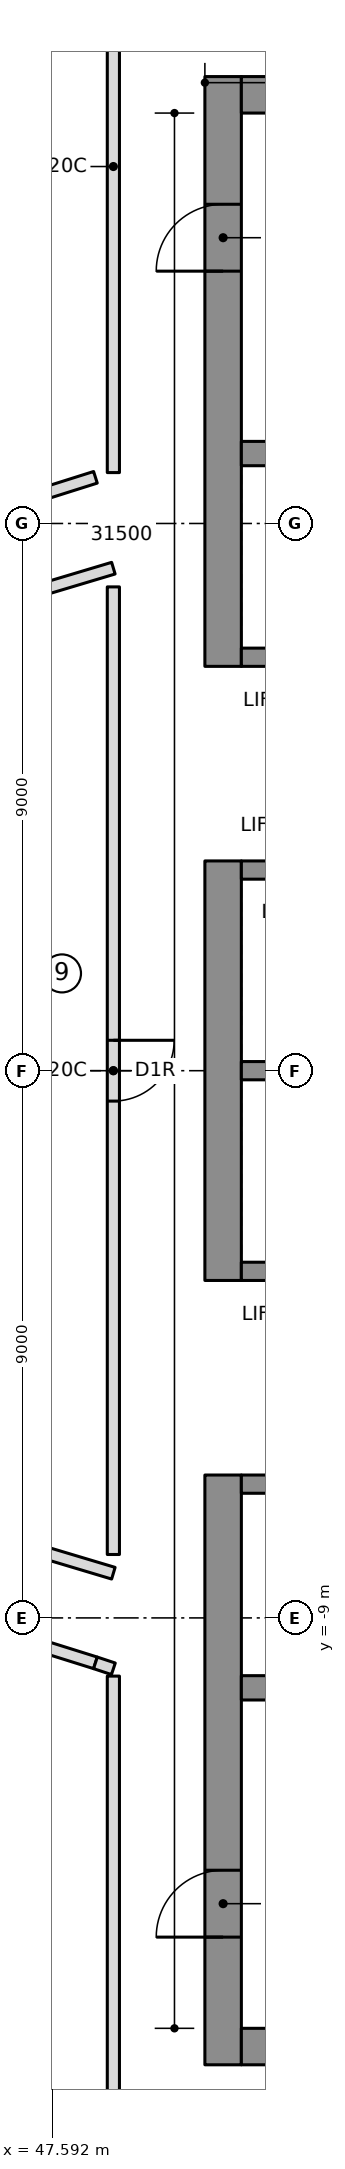
"""IFC4 building model, lengths in metres.
Left out: names, types, materials, properties, quantities, classifications, styles, units other than length and angle.
Written with IfcOpenShell. Run it as: python <this file> out.ifc"""

import sys

from ifc_helpers import new_model, si_unit, direction, frame, frame_2d, origin, place, context, subcontext, project, spatial, rectangle, extrude, element, fill, save


model = new_model("IFC4")
c1 = context("Model", 3, precision=1e-05, world=origin(), true_north=direction((0.0, 1.0)))
c2 = subcontext(c1, "Body", "Model", "MODEL_VIEW")
j1 = project(units=[si_unit("LENGTHUNIT", "METRE"), si_unit("PLANEANGLEUNIT", "RADIAN")], contexts=[c1])
p1 = place(None, origin())
s1 = spatial("IfcSite", under=j1, at=p1, CompositionType="ELEMENT")
p2 = place(p1, origin())
s2 = spatial("IfcBuilding", under=s1, at=p2, CompositionType="ELEMENT")
p3 = place(p2, frame((0.0, 0.0, 238.55)))
s3 = spatial("IfcBuildingStorey", under=s2, at=p3, CompositionType="ELEMENT", Elevation=238.55)
p4 = place(p3, frame((50.4, 6.65, 0.0), z_axis=(0.0, 0.0, 1.0), x_axis=(0.0, 1.0, 0.0)))
e1 = element("IfcWall", 1, at=p4, inside=s3, PredefinedType="SHEAR", context=c2, shape_type="SweptSolid", body=[
    extrude(rectangle(XDim=9.7, YDim=0.6, at=frame_2d((4.85, 0.0))), origin(), (0.0, 0.0, 1.0), 3.55),
])
p5 = place(p4, frame((6.5, 0.0, 0.0)))
e2 = element("IfcOpeningElement", 2, at=p5, cuts=e1, PredefinedType="OPENING", context=c2, shape_type="SweptSolid", body=[
    extrude(rectangle(XDim=1.1, YDim=2.1, at=frame_2d((0.55, 1.05))), frame((0.0, 0.31, 0.0), z_axis=(0.0, -1.0, 0.0), x_axis=(1.0, 0.0, 0.0)), (0.0, 0.0, 1.0), 0.62),
])
p6 = place(p3, frame((50.4, -3.45, 0.0), z_axis=(0.0, 0.0, 1.0), x_axis=(0.0, 1.0, 0.0)))
e3 = element("IfcWall", 3, at=p6, inside=s3, PredefinedType="SHEAR", context=c2, shape_type="SweptSolid", body=[
    extrude(rectangle(XDim=6.9, YDim=0.6, at=frame_2d((3.45, 0.0))), origin(), (0.0, 0.0, 1.0), 3.55),
])
p7 = place(p3, frame((50.4, -16.35, 0.0), z_axis=(0.0, 0.0, 1.0), x_axis=(0.0, 1.0, 0.0)))
e4 = element("IfcWall", 4, at=p7, inside=s3, PredefinedType="SHEAR", context=c2, shape_type="SweptSolid", body=[
    extrude(rectangle(XDim=9.7, YDim=0.6, at=frame_2d((4.85, 0.0))), origin(), (0.0, 0.0, 1.0), 3.55),
])
p8 = place(p7, frame((2.1, 0.0, 0.0)))
e5 = element("IfcOpeningElement", 5, at=p8, cuts=e4, PredefinedType="OPENING", context=c2, shape_type="SweptSolid", body=[
    extrude(rectangle(XDim=1.1, YDim=2.1, at=frame_2d((0.55, 1.05))), frame((0.0, 0.31, 0.0), z_axis=(0.0, -1.0, 0.0), x_axis=(1.0, 0.0, 0.0)), (0.0, 0.0, 1.0), 0.62),
])
for number, where, z_axis, x_axis in (
    (6, (50.7, 16.05, 0.0), (0.0, 0.0, 1.0), (1.0, 0.0, 0.0)),
    (7, (50.7, -16.05, 0.0), (0.0, 0.0, 1.0), (1.0, 0.0, 0.0)),
):
    element("IfcWall", number, at=place(p3, frame(where, z_axis=z_axis, x_axis=x_axis)), inside=s3, PredefinedType="SHEAR", context=c2, shape_type="SweptSolid", body=[
        extrude(rectangle(XDim=13.62, YDim=0.6, at=frame_2d((6.81, 0.0))), origin(), (0.0, 0.0, 1.0), 3.55),
    ])
p9 = place(p3, frame((50.7, 10.15, 0.0), z_axis=(0.0, 0.0, 1.0), x_axis=(1.0, 0.0, 0.0)))
e8 = element("IfcWall", 8, at=p9, inside=s3, PredefinedType="SHEAR", context=c2, shape_type="SweptSolid", body=[
    extrude(rectangle(XDim=13.02, YDim=0.4, at=frame_2d((6.51, 0.0))), origin(), (0.0, 0.0, 1.0), 3.55),
])
p10 = place(p9, frame((0.7, 0.0, 0.0)))
e9 = element("IfcOpeningElement", 9, at=p10, cuts=e8, PredefinedType="OPENING", context=c2, shape_type="SweptSolid", body=[
    extrude(rectangle(XDim=1.1, YDim=2.1, at=frame_2d((0.55, 1.05))), frame((0.0, 0.21, 0.0), z_axis=(0.0, -1.0, 0.0), x_axis=(1.0, 0.0, 0.0)), (0.0, 0.0, 1.0), 0.42),
])
p11 = place(p9, frame((3.5, 0.0, 0.0)))
e10 = element("IfcOpeningElement", 10, at=p11, cuts=e8, PredefinedType="OPENING", context=c2, shape_type="SweptSolid", body=[
    extrude(rectangle(XDim=1.1, YDim=2.1, at=frame_2d((0.55, 1.05))), frame((0.0, 0.21, 0.0), z_axis=(0.0, -1.0, 0.0), x_axis=(1.0, 0.0, 0.0)), (0.0, 0.0, 1.0), 0.42),
])
p12 = place(p3, frame((50.7, -10.15, 0.0), z_axis=(0.0, 0.0, 1.0), x_axis=(1.0, 0.0, 0.0)))
e11 = element("IfcWall", 11, at=p12, inside=s3, PredefinedType="SHEAR", context=c2, shape_type="SweptSolid", body=[
    extrude(rectangle(XDim=13.02, YDim=0.4, at=frame_2d((6.51, 0.0))), origin(), (0.0, 0.0, 1.0), 3.55),
])
p13 = place(p3, frame((50.7, 0.0, 0.0), z_axis=(0.0, 0.0, 1.0), x_axis=(1.0, 0.0, 0.0)))
e12 = element("IfcWall", 12, at=p13, inside=s3, PredefinedType="SHEAR", context=c2, shape_type="SweptSolid", body=[
    extrude(rectangle(XDim=10.9, YDim=0.3, at=frame_2d((5.45, 0.0))), origin(), (0.0, 0.0, 1.0), 3.55),
])
p14 = place(p3, frame((50.7, 3.3, 0.0), z_axis=(0.0, 0.0, 1.0), x_axis=(1.0, 0.0, 0.0)))
e13 = element("IfcWall", 13, at=p14, inside=s3, PredefinedType="SHEAR", context=c2, shape_type="SweptSolid", body=[
    extrude(rectangle(XDim=10.9, YDim=0.3, at=frame_2d((5.45, 0.0))), origin(), (0.0, 0.0, 1.0), 3.55),
])
p15 = place(p14, frame((0.7, 0.0, 0.0)))
e14 = element("IfcOpeningElement", 14, at=p15, cuts=e13, PredefinedType="OPENING", context=c2, shape_type="SweptSolid", body=[
    extrude(rectangle(XDim=1.1, YDim=2.1, at=frame_2d((0.55, 1.05))), frame((0.0, 0.16, 0.0), z_axis=(0.0, -1.0, 0.0), x_axis=(1.0, 0.0, 0.0)), (0.0, 0.0, 1.0), 0.32),
])
p16 = place(p14, frame((3.5, 0.0, 0.0)))
e15 = element("IfcOpeningElement", 15, at=p16, cuts=e13, PredefinedType="OPENING", context=c2, shape_type="SweptSolid", body=[
    extrude(rectangle(XDim=1.1, YDim=2.1, at=frame_2d((0.55, 1.05))), frame((0.0, 0.16, 0.0), z_axis=(0.0, -1.0, 0.0), x_axis=(1.0, 0.0, 0.0)), (0.0, 0.0, 1.0), 0.32),
])
p17 = place(p14, frame((6.4, 0.0, 0.0)))
e16 = element("IfcOpeningElement", 16, at=p17, cuts=e13, PredefinedType="OPENING", context=c2, shape_type="SweptSolid", body=[
    extrude(rectangle(XDim=0.9, YDim=2.1, at=frame_2d((0.45, 1.05))), frame((0.0, 0.16, 0.0), z_axis=(0.0, -1.0, 0.0), x_axis=(1.0, 0.0, 0.0)), (0.0, 0.0, 1.0), 0.32),
])
p18 = place(p14, frame((9.2, 0.0, 0.0)))
e17 = element("IfcOpeningElement", 17, at=p18, cuts=e13, PredefinedType="OPENING", context=c2, shape_type="SweptSolid", body=[
    extrude(rectangle(XDim=0.9, YDim=2.1, at=frame_2d((0.45, 1.05))), frame((0.0, 0.16, 0.0), z_axis=(0.0, -1.0, 0.0), x_axis=(1.0, 0.0, 0.0)), (0.0, 0.0, 1.0), 0.32),
])
p19 = place(p3, frame((50.7, 6.8, 0.0), z_axis=(0.0, 0.0, 1.0), x_axis=(1.0, 0.0, 0.0)))
e18 = element("IfcWall", 18, at=p19, inside=s3, PredefinedType="SHEAR", context=c2, shape_type="SweptSolid", body=[
    extrude(rectangle(XDim=10.9, YDim=0.3, at=frame_2d((5.45, 0.0))), origin(), (0.0, 0.0, 1.0), 3.55),
])
p20 = place(p19, frame((6.4, 0.0, 0.0)))
e19 = element("IfcOpeningElement", 19, at=p20, cuts=e18, PredefinedType="OPENING", context=c2, shape_type="SweptSolid", body=[
    extrude(rectangle(XDim=0.9, YDim=2.1, at=frame_2d((0.45, 1.05))), frame((0.0, 0.16, 0.0), z_axis=(0.0, -1.0, 0.0), x_axis=(1.0, 0.0, 0.0)), (0.0, 0.0, 1.0), 0.32),
])
p21 = place(p19, frame((9.2, 0.0, 0.0)))
e20 = element("IfcOpeningElement", 20, at=p21, cuts=e18, PredefinedType="OPENING", context=c2, shape_type="SweptSolid", body=[
    extrude(rectangle(XDim=0.9, YDim=2.1, at=frame_2d((0.45, 1.05))), frame((0.0, 0.16, 0.0), z_axis=(0.0, -1.0, 0.0), x_axis=(1.0, 0.0, 0.0)), (0.0, 0.0, 1.0), 0.32),
])
p22 = place(p3, frame((50.7, -3.3, 0.0), z_axis=(0.0, 0.0, 1.0), x_axis=(1.0, 0.0, 0.0)))
e21 = element("IfcWall", 21, at=p22, inside=s3, PredefinedType="SHEAR", context=c2, shape_type="SweptSolid", body=[
    extrude(rectangle(XDim=10.9, YDim=0.3, at=frame_2d((5.45, 0.0))), origin(), (0.0, 0.0, 1.0), 3.55),
])
p23 = place(p22, frame((9.1, 0.0, 0.0)))
e22 = element("IfcOpeningElement", 22, at=p23, cuts=e21, PredefinedType="OPENING", context=c2, shape_type="SweptSolid", body=[
    extrude(rectangle(XDim=1.1, YDim=2.1, at=frame_2d((0.55, 1.05))), frame((0.0, 0.16, 0.0), z_axis=(0.0, -1.0, 0.0), x_axis=(1.0, 0.0, 0.0)), (0.0, 0.0, 1.0), 0.32),
])
p24 = place(p3, frame((50.7, -6.8, 0.0), z_axis=(0.0, 0.0, 1.0), x_axis=(1.0, 0.0, 0.0)))
e23 = element("IfcWall", 23, at=p24, inside=s3, PredefinedType="SHEAR", context=c2, shape_type="SweptSolid", body=[
    extrude(rectangle(XDim=10.9, YDim=0.3, at=frame_2d((5.45, 0.0))), origin(), (0.0, 0.0, 1.0), 3.55),
])
p25 = place(p24, frame((6.3, 0.0, 0.0)))
e24 = element("IfcOpeningElement", 24, at=p25, cuts=e23, PredefinedType="OPENING", context=c2, shape_type="SweptSolid", body=[
    extrude(rectangle(XDim=1.1, YDim=2.1, at=frame_2d((0.55, 1.05))), frame((0.0, 0.16, 0.0), z_axis=(0.0, -1.0, 0.0), x_axis=(1.0, 0.0, 0.0)), (0.0, 0.0, 1.0), 0.32),
])
p26 = place(p24, frame((9.1, 0.0, 0.0)))
e25 = element("IfcOpeningElement", 25, at=p26, cuts=e23, PredefinedType="OPENING", context=c2, shape_type="SweptSolid", body=[
    extrude(rectangle(XDim=1.1, YDim=2.1, at=frame_2d((0.55, 1.05))), frame((0.0, 0.16, 0.0), z_axis=(0.0, -1.0, 0.0), x_axis=(1.0, 0.0, 0.0)), (0.0, 0.0, 1.0), 0.32),
])
p27 = place(p24, frame((0.8, 0.0, 0.0)))
e26 = element("IfcOpeningElement", 26, at=p27, cuts=e23, PredefinedType="OPENING", context=c2, shape_type="SweptSolid", body=[
    extrude(rectangle(XDim=0.9, YDim=2.1, at=frame_2d((0.45, 1.05))), frame((0.0, 0.16, 0.0), z_axis=(0.0, -1.0, 0.0), x_axis=(1.0, 0.0, 0.0)), (0.0, 0.0, 1.0), 0.32),
])
p28 = place(p24, frame((3.6, 0.0, 0.0)))
e27 = element("IfcOpeningElement", 27, at=p28, cuts=e23, PredefinedType="OPENING", context=c2, shape_type="SweptSolid", body=[
    extrude(rectangle(XDim=0.9, YDim=2.1, at=frame_2d((0.45, 1.05))), frame((0.0, 0.16, 0.0), z_axis=(0.0, -1.0, 0.0), x_axis=(1.0, 0.0, 0.0)), (0.0, 0.0, 1.0), 0.32),
])
p29 = place(p3, frame((40.38, 7.257, 0.0), z_axis=(0.0, 0.0, 1.0), x_axis=(0.953536454425, 0.301277662768, 0.0)))
e28 = element("IfcWall", 28, at=p29, inside=s3, PredefinedType="PARTITIONING", context=c2, shape_type="SweptSolid", body=[
    extrude(rectangle(XDim=8.306, YDim=0.2, at=frame_2d((4.153, 0.0))), origin(), (0.0, 0.0, 1.0), 3.25),
])
p30 = place(p29, frame((2.8, 0.0, 0.0)))
e29 = element("IfcOpeningElement", 29, at=p30, cuts=e28, PredefinedType="OPENING", context=c2, shape_type="SweptSolid", body=[
    extrude(rectangle(XDim=1.5, YDim=2.1, at=frame_2d((0.75, 1.05))), frame((0.0, 0.11, 0.0), z_axis=(0.0, -1.0, 0.0), x_axis=(1.0, 0.0, 0.0)), (0.0, 0.0, 1.0), 0.22),
])
p31 = place(p3, frame((40.38, -7.257, 0.0), z_axis=(0.0, 0.0, 1.0), x_axis=(0.954235234728, -0.299057046068, 0.0)))
e30 = element("IfcWall", 30, at=p31, inside=s3, PredefinedType="PARTITIONING", context=c2, shape_type="SweptSolid", body=[
    extrude(rectangle(XDim=8.3, YDim=0.2, at=frame_2d((4.15, 0.0))), origin(), (0.0, 0.0, 1.0), 3.25),
])
p32 = place(p31, frame((2.8, 0.0, 0.0)))
e31 = element("IfcOpeningElement", 31, at=p32, cuts=e30, PredefinedType="OPENING", context=c2, shape_type="SweptSolid", body=[
    extrude(rectangle(XDim=1.5, YDim=2.1, at=frame_2d((0.75, 1.05))), frame((0.0, 0.11, 0.0), z_axis=(0.0, -1.0, 0.0), x_axis=(1.0, 0.0, 0.0)), (0.0, 0.0, 1.0), 0.22),
])
p33 = place(p3, frame((48.595, 7.957, 0.0), z_axis=(0.0, 0.0, 1.0), x_axis=(0.0, -1.0, 0.0)))
e32 = element("IfcWall", 32, at=p33, inside=s3, PredefinedType="PARTITIONING", context=c2, shape_type="SweptSolid", body=[
    extrude(rectangle(XDim=15.914, YDim=0.2, at=frame_2d((7.957, 0.0))), origin(), (0.0, 0.0, 1.0), 3.25),
])
p34 = place(p33, frame((7.457, 0.0, 0.0)))
e33 = element("IfcOpeningElement", 33, at=p34, cuts=e32, PredefinedType="OPENING", context=c2, shape_type="SweptSolid", body=[
    extrude(rectangle(XDim=1.0, YDim=2.1, at=frame_2d((0.5, 1.05))), frame((0.0, 0.11, 0.0), z_axis=(0.0, -1.0, 0.0), x_axis=(1.0, 0.0, 0.0)), (0.0, 0.0, 1.0), 0.22),
])
for number, where, z_axis, x_axis in (
    (34, (46.855, 7.744, 0.0), (0.0, 0.0, 1.0), (0.958, 0.287, 0.0)),
    (35, (48.595, -8.265, 0.0), (0.0, 0.0, 1.0), (-0.958, 0.287, 0.0)),
):
    element("IfcWall", number, at=place(p3, frame(where, z_axis=z_axis, x_axis=x_axis)), inside=s3, PredefinedType="PARTITIONING", context=c2, shape_type="SweptSolid", body=[
        extrude(rectangle(XDim=1.816, YDim=0.2, at=frame_2d((0.908, 0.0))), origin(), (0.0, 0.0, 1.0), 3.25),
    ])
p35 = place(p3, frame((48.595, 19.904, 0.0), z_axis=(0.0, 0.0, 1.0), x_axis=(0.0, -1.0, 0.0)))
e36 = element("IfcWall", 36, at=p35, inside=s3, PredefinedType="PARTITIONING", context=c2, shape_type="SweptSolid", body=[
    extrude(rectangle(XDim=10.067, YDim=0.2, at=frame_2d((5.034, 0.0))), origin(), (0.0, 0.0, 1.0), 3.25),
])
p36 = place(p3, frame((48.3, -9.739, 0.0), z_axis=(0.0, 0.0, 1.0), x_axis=(0.949310105444, -0.314341094518, 0.0)))
e37 = element("IfcWall", 37, at=p36, inside=s3, PredefinedType="PARTITIONING", context=c2, shape_type="SweptSolid", body=[
    extrude(rectangle(XDim=0.311, YDim=0.2, at=frame_2d((0.155, 0.0))), origin(), (0.0, 0.0, 1.0), 3.25),
])
p37 = place(p3, frame((48.595, -9.957, 0.0), z_axis=(0.0, 0.0, 1.0), x_axis=(0.0, -1.0, 0.0)))
e38 = element("IfcWall", 38, at=p37, inside=s3, PredefinedType="PARTITIONING", context=c2, shape_type="SweptSolid", body=[
    extrude(rectangle(XDim=9.947, YDim=0.2, at=frame_2d((4.974, 0.0))), origin(), (0.0, 0.0, 1.0), 3.25),
])
p38 = place(p34, origin())
e39 = element("IfcDoor", 39, at=p38, inside=s3, OperationType="SINGLE_SWING_RIGHT", PredefinedType="DOOR", context=c2, shape_type="SweptSolid", body=[
    extrude(rectangle(XDim=1.0, YDim=2.1, at=frame_2d((0.5, 1.05))), frame((0.0, 0.025, 0.0), z_axis=(0.0, -1.0, 0.0), x_axis=(1.0, 0.0, 0.0)), (0.0, 0.0, 1.0), 0.05),
])
fill(e33, e39)
p39 = place(p5, origin())
e40 = element("IfcDoor", 40, at=p39, inside=s3, OperationType="SINGLE_SWING_RIGHT", PredefinedType="DOOR", context=c2, shape_type="SweptSolid", body=[
    extrude(rectangle(XDim=1.1, YDim=2.1, at=frame_2d((0.55, 1.05))), frame((0.0, 0.025, 0.0), z_axis=(0.0, -1.0, 0.0), x_axis=(1.0, 0.0, 0.0)), (0.0, 0.0, 1.0), 0.05),
])
fill(e2, e40)
p40 = place(p8, origin())
e41 = element("IfcDoor", 41, at=p40, inside=s3, OperationType="SINGLE_SWING_RIGHT", PredefinedType="DOOR", context=c2, shape_type="SweptSolid", body=[
    extrude(rectangle(XDim=1.1, YDim=2.1, at=frame_2d((0.55, 1.05))), frame((0.0, 0.025, 0.0), z_axis=(0.0, -1.0, 0.0), x_axis=(1.0, 0.0, 0.0)), (0.0, 0.0, 1.0), 0.05),
])
fill(e5, e41)
save(model, sys.argv[1])
